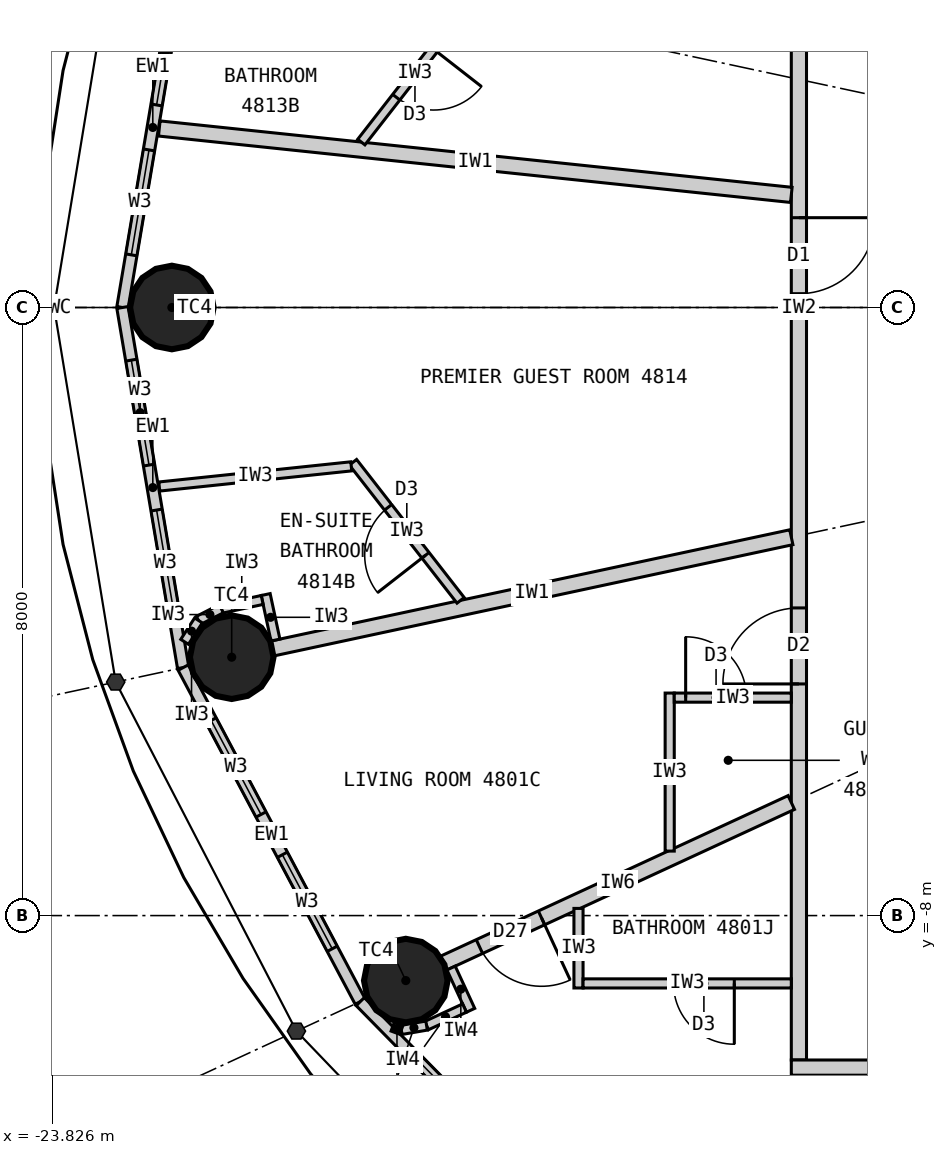
"""IFC4 building model, lengths in metres.
Left out: names, types, materials, properties, quantities, classifications, styles, units other than length and angle.
Written with IfcOpenShell. Run it as: python <this file> out.ifc"""

import sys

from ifc_helpers import new_model, si_unit, direction, frame, frame_2d, origin, origin_2d, place, context, subcontext, project, spatial, rectangle, circle, extrude, element, fill, save


model = new_model("IFC4")
c1 = context("Model", 3, precision=1e-05, world=origin(), true_north=direction((0.0, 1.0)))
c2 = subcontext(c1, "Body", "Model", "MODEL_VIEW")
j1 = project(units=[si_unit("LENGTHUNIT", "METRE"), si_unit("PLANEANGLEUNIT", "RADIAN")], contexts=[c1])
p1 = place(None, origin())
s1 = spatial("IfcSite", under=j1, at=p1, CompositionType="ELEMENT")
p2 = place(p1, origin())
s2 = spatial("IfcBuilding", under=s1, at=p2, CompositionType="ELEMENT")
p3 = place(p2, frame((0.0, 0.0, 179.7)))
s3 = spatial("IfcBuildingStorey", under=s2, at=p3, CompositionType="ELEMENT", Elevation=179.7)
for number, where, z_axis, x_axis in (
    (1, (-22.25, 0.0, 0.0), (0.0, 0.0, 1.0), (1.0, 0.0, 0.0)),
    (2, (-21.463, -4.601, 0.0), (0.0, 0.0, 1.0), (1.0, 0.0, 0.0)),
    (3, (-19.172, -8.855, 0.0), (0.0, 0.0, 1.0), (1.0, 0.0, 0.0)),
):
    element("IfcColumn", number, at=place(p3, frame(where, z_axis=z_axis, x_axis=x_axis)), inside=s3, PredefinedType="COLUMN", context=c2, shape_type="SweptSolid", body=[
        extrude(circle(Radius=0.55, at=origin_2d()), origin(), (0.0, 0.0, 1.0), 3.3),
    ])
p4 = place(p3, frame((-22.102, 4.738, 0.0), z_axis=(0.0, 0.0, 1.0), x_axis=(-0.166162111254, -0.986098449843, 0.0)))
e4 = element("IfcWall", 4, at=p4, inside=s3, PredefinedType="ELEMENTEDWALL", context=c2, shape_type="SweptSolid", body=[
    extrude(rectangle(XDim=4.805, YDim=0.15, at=frame_2d((2.402, 0.0))), origin(), (0.0, 0.0, 1.0), 3.12),
])
p5 = place(p4, frame((0.702, 0.0, 0.9)))
e5 = element("IfcOpeningElement", 5, at=p5, cuts=e4, PredefinedType="OPENING", context=c2, shape_type="SweptSolid", body=[
    extrude(rectangle(XDim=1.4, YDim=1.9, at=frame_2d((0.7, 0.95))), frame((0.0, 0.085, 0.0), z_axis=(0.0, -1.0, 0.0), x_axis=(1.0, 0.0, 0.0)), (0.0, 0.0, 1.0), 0.17),
])
p6 = place(p4, frame((2.702, 0.0, 0.9)))
e6 = element("IfcOpeningElement", 6, at=p6, cuts=e4, PredefinedType="OPENING", context=c2, shape_type="SweptSolid", body=[
    extrude(rectangle(XDim=1.4, YDim=1.9, at=frame_2d((0.7, 0.95))), frame((0.0, 0.085, 0.0), z_axis=(0.0, -1.0, 0.0), x_axis=(1.0, 0.0, 0.0)), (0.0, 0.0, 1.0), 0.17),
])
p7 = place(p3, frame((-22.9, 0.0, 0.0), z_axis=(0.0, 0.0, 1.0), x_axis=(0.166162111254, -0.986098449843, 0.0)))
e7 = element("IfcWall", 7, at=p7, inside=s3, PredefinedType="ELEMENTEDWALL", context=c2, shape_type="SweptSolid", body=[
    extrude(rectangle(XDim=4.805, YDim=0.15, at=frame_2d((2.402, 0.0))), origin(), (0.0, 0.0, 1.0), 3.12),
])
p8 = place(p7, frame((0.702, 0.0, 0.9)))
e8 = element("IfcOpeningElement", 8, at=p8, cuts=e7, PredefinedType="OPENING", context=c2, shape_type="SweptSolid", body=[
    extrude(rectangle(XDim=1.4, YDim=1.9, at=frame_2d((0.7, 0.95))), frame((0.0, 0.085, 0.0), z_axis=(0.0, -1.0, 0.0), x_axis=(1.0, 0.0, 0.0)), (0.0, 0.0, 1.0), 0.17),
])
p9 = place(p7, frame((2.702, 0.0, 0.9)))
e9 = element("IfcOpeningElement", 9, at=p9, cuts=e7, PredefinedType="OPENING", context=c2, shape_type="SweptSolid", body=[
    extrude(rectangle(XDim=1.4, YDim=1.9, at=frame_2d((0.7, 0.95))), frame((0.0, 0.085, 0.0), z_axis=(0.0, -1.0, 0.0), x_axis=(1.0, 0.0, 0.0)), (0.0, 0.0, 1.0), 0.17),
])
p10 = place(p3, frame((-22.102, -4.738, 0.0), z_axis=(0.0, 0.0, 1.0), x_axis=(0.468428906714, -0.883501193748, 0.0)))
e10 = element("IfcWall", 10, at=p10, inside=s3, PredefinedType="ELEMENTEDWALL", context=c2, shape_type="SweptSolid", body=[
    extrude(rectangle(XDim=4.974, YDim=0.15, at=frame_2d((2.487, 0.0))), origin(), (0.0, 0.0, 1.0), 3.12),
])
p11 = place(p10, frame((0.787, 0.0, 0.9)))
e11 = element("IfcOpeningElement", 11, at=p11, cuts=e10, PredefinedType="OPENING", context=c2, shape_type="SweptSolid", body=[
    extrude(rectangle(XDim=1.4, YDim=1.9, at=frame_2d((0.7, 0.95))), frame((0.0, 0.085, 0.0), z_axis=(0.0, -1.0, 0.0), x_axis=(1.0, 0.0, 0.0)), (0.0, 0.0, 1.0), 0.17),
])
p12 = place(p10, frame((2.787, 0.0, 0.9)))
e12 = element("IfcOpeningElement", 12, at=p12, cuts=e10, PredefinedType="OPENING", context=c2, shape_type="SweptSolid", body=[
    extrude(rectangle(XDim=1.4, YDim=1.9, at=frame_2d((0.7, 0.95))), frame((0.0, 0.085, 0.0), z_axis=(0.0, -1.0, 0.0), x_axis=(1.0, 0.0, 0.0)), (0.0, 0.0, 1.0), 0.17),
])
p13 = place(p3, frame((-19.772, -9.132, 0.0), z_axis=(0.0, 0.0, 1.0), x_axis=(0.700727467776, -0.71342905457, 0.0)))
e13 = element("IfcWall", 13, at=p13, inside=s3, PredefinedType="ELEMENTEDWALL", context=c2, shape_type="SweptSolid", body=[
    extrude(rectangle(XDim=5.247, YDim=0.15, at=frame_2d((2.624, 0.0))), origin(), (0.0, 0.0, 1.0), 3.12),
])
p14 = place(p13, frame((0.924, 0.0, 0.9)))
e14 = element("IfcOpeningElement", 14, at=p14, cuts=e13, PredefinedType="OPENING", context=c2, shape_type="SweptSolid", body=[
    extrude(rectangle(XDim=1.4, YDim=1.9, at=frame_2d((0.7, 0.95))), frame((0.0, 0.085, 0.0), z_axis=(0.0, -1.0, 0.0), x_axis=(1.0, 0.0, 0.0)), (0.0, 0.0, 1.0), 0.17),
])
p15 = place(p13, frame((2.924, 0.0, 0.9)))
e15 = element("IfcOpeningElement", 15, at=p15, cuts=e13, PredefinedType="OPENING", context=c2, shape_type="SweptSolid", body=[
    extrude(rectangle(XDim=1.4, YDim=1.9, at=frame_2d((0.7, 0.95))), frame((0.0, 0.085, 0.0), z_axis=(0.0, -1.0, 0.0), x_axis=(1.0, 0.0, 0.0)), (0.0, 0.0, 1.0), 0.17),
])
p16 = place(p3, frame((-14.0, 9.9, 0.0), z_axis=(0.0, 0.0, 1.0), x_axis=(0.0, -1.0, 0.0)))
e16 = element("IfcWall", 16, at=p16, inside=s3, PredefinedType="PARTITIONING", context=c2, shape_type="SweptSolid", body=[
    extrude(rectangle(XDim=19.8, YDim=0.2, at=frame_2d((9.9, 0.0))), origin(), (0.0, 0.0, 1.0), 3.12),
])
p17 = place(p16, frame((13.853, 0.0, 0.0)))
e17 = element("IfcOpeningElement", 17, at=p17, cuts=e16, PredefinedType="OPENING", context=c2, shape_type="SweptSolid", body=[
    extrude(rectangle(XDim=1.0, YDim=2.2, at=frame_2d((0.5, 1.1))), frame((0.0, 0.11, 0.0), z_axis=(0.0, -1.0, 0.0), x_axis=(1.0, 0.0, 0.0)), (0.0, 0.0, 1.0), 0.22),
])
p18 = place(p16, frame((1.1, 0.0, 0.0)))
e18 = element("IfcOpeningElement", 18, at=p18, cuts=e16, PredefinedType="OPENING", context=c2, shape_type="SweptSolid", body=[
    extrude(rectangle(XDim=1.0, YDim=2.2, at=frame_2d((0.5, 1.1))), frame((0.0, 0.11, 0.0), z_axis=(0.0, -1.0, 0.0), x_axis=(1.0, 0.0, 0.0)), (0.0, 0.0, 1.0), 0.22),
])
p19 = place(p16, frame((3.688, 0.0, 0.0)))
e19 = element("IfcOpeningElement", 19, at=p19, cuts=e16, PredefinedType="OPENING", context=c2, shape_type="SweptSolid", body=[
    extrude(rectangle(XDim=1.0, YDim=2.2, at=frame_2d((0.5, 1.1))), frame((0.0, 0.11, 0.0), z_axis=(0.0, -1.0, 0.0), x_axis=(1.0, 0.0, 0.0)), (0.0, 0.0, 1.0), 0.22),
])
p20 = place(p16, frame((8.719, 0.0, 0.0)))
e20 = element("IfcOpeningElement", 20, at=p20, cuts=e16, PredefinedType="OPENING", context=c2, shape_type="SweptSolid", body=[
    extrude(rectangle(XDim=1.0, YDim=2.2, at=frame_2d((0.5, 1.1))), frame((0.0, 0.11, 0.0), z_axis=(0.0, -1.0, 0.0), x_axis=(1.0, 0.0, 0.0)), (0.0, 0.0, 1.0), 0.22),
])
p21 = place(p3, frame((-14.1, 1.481, 0.0), z_axis=(0.0, 0.0, 1.0), x_axis=(-0.994524794819, 0.104500873159, 0.0)))
e21 = element("IfcWall", 21, at=p21, inside=s3, PredefinedType="PARTITIONING", context=c2, shape_type="SweptSolid", body=[
    extrude(rectangle(XDim=8.362, YDim=0.2, at=frame_2d((4.181, 0.0))), origin(), (0.0, 0.0, 1.0), 2.37),
])
p22 = place(p3, frame((-14.1, -3.022, 0.0), z_axis=(0.0, 0.0, 1.0), x_axis=(-0.977790639684, -0.209584028367, 0.0)))
e22 = element("IfcWall", 22, at=p22, inside=s3, PredefinedType="PARTITIONING", context=c2, shape_type="SweptSolid", body=[
    extrude(rectangle(XDim=6.98, YDim=0.2, at=frame_2d((3.49, 0.0))), origin(), (0.0, 0.0, 1.0), 2.27),
])
p23 = place(p3, frame((-14.1, -6.512, 0.0), z_axis=(0.0, 0.0, 1.0), x_axis=(-0.907823150669, -0.419353224751, 0.0)))
e23 = element("IfcWall", 23, at=p23, inside=s3, PredefinedType="PARTITIONING", context=c2, shape_type="SweptSolid", body=[
    extrude(rectangle(XDim=5.037, YDim=0.2, at=frame_2d((2.519, 0.0))), origin(), (0.0, 0.0, 1.0), 2.22),
])
p24 = place(p23, frame((3.62, 0.0, 0.0)))
e24 = element("IfcOpeningElement", 24, at=p24, cuts=e23, PredefinedType="OPENING", context=c2, shape_type="SweptSolid", body=[
    extrude(rectangle(XDim=0.9, YDim=2.1, at=frame_2d((0.45, 1.05))), frame((0.0, 0.11, 0.0), z_axis=(0.0, -1.0, 0.0), x_axis=(1.0, 0.0, 0.0)), (0.0, 0.0, 1.0), 0.22),
])
p25 = place(p3, frame((-12.625, -10.1, 0.0), z_axis=(0.0, 0.0, 1.0), x_axis=(-0.780876185034, -0.624685827954, 0.0)))
e25 = element("IfcWall", 25, at=p25, inside=s3, PredefinedType="PARTITIONING", context=c2, shape_type="SweptSolid", body=[
    extrude(rectangle(XDim=3.229, YDim=0.2, at=frame_2d((1.615, 0.0))), origin(), (0.0, 0.0, 1.0), 2.27),
])
p26 = place(p3, frame((-15.7, -7.152, 0.0), z_axis=(0.0, 0.0, 1.0), x_axis=(0.0, 1.0, 0.0)))
e26 = element("IfcWall", 26, at=p26, inside=s3, PredefinedType="PARTITIONING", context=c2, shape_type="SweptSolid", body=[
    extrude(rectangle(XDim=2.079, YDim=0.12, at=frame_2d((1.04, 0.0))), origin(), (0.0, 0.0, 1.0), 3.12),
])
p27 = place(p3, frame((-14.1, -5.133, 0.0), z_axis=(0.0, 0.0, 1.0), x_axis=(-1.0, 0.0, 0.0)))
e27 = element("IfcWall", 27, at=p27, inside=s3, PredefinedType="PARTITIONING", context=c2, shape_type="SweptSolid", body=[
    extrude(rectangle(XDim=1.54, YDim=0.12, at=frame_2d((0.77, 0.0))), origin(), (0.0, 0.0, 1.0), 3.12),
])
p28 = place(p27, frame((0.59, 0.0, 0.0)))
e28 = element("IfcOpeningElement", 28, at=p28, cuts=e27, PredefinedType="OPENING", context=c2, shape_type="SweptSolid", body=[
    extrude(rectangle(XDim=0.8, YDim=2.1, at=frame_2d((0.4, 1.05))), frame((0.0, 0.07, 0.0), z_axis=(0.0, -1.0, 0.0), x_axis=(1.0, 0.0, 0.0)), (0.0, 0.0, 1.0), 0.14),
])
p29 = place(p3, frame((-16.9, -7.906, 0.0), z_axis=(0.0, 0.0, 1.0), x_axis=(0.0, -1.0, 0.0)))
e29 = element("IfcWall", 29, at=p29, inside=s3, PredefinedType="PARTITIONING", context=c2, shape_type="SweptSolid", body=[
    extrude(rectangle(XDim=1.047, YDim=0.12, at=frame_2d((0.523, 0.0))), origin(), (0.0, 0.0, 1.0), 3.12),
])
p30 = place(p3, frame((-14.1, -8.893, 0.0), z_axis=(0.0, 0.0, 1.0), x_axis=(-1.0, 0.0, 0.0)))
e30 = element("IfcWall", 30, at=p30, inside=s3, PredefinedType="PARTITIONING", context=c2, shape_type="SweptSolid", body=[
    extrude(rectangle(XDim=2.74, YDim=0.12, at=frame_2d((1.37, 0.0))), origin(), (0.0, 0.0, 1.0), 3.12),
])
p31 = place(p30, frame((0.75, 0.0, 0.0)))
e31 = element("IfcOpeningElement", 31, at=p31, cuts=e30, PredefinedType="OPENING", context=c2, shape_type="SweptSolid", body=[
    extrude(rectangle(XDim=0.8, YDim=2.1, at=frame_2d((0.4, 1.05))), frame((0.0, 0.07, 0.0), z_axis=(0.0, -1.0, 0.0), x_axis=(1.0, 0.0, 0.0)), (0.0, 0.0, 1.0), 0.14),
])
p32 = place(p3, frame((-19.758, 2.177, 0.0), z_axis=(0.0, 0.0, 1.0), x_axis=(0.614713147302, 0.788750750576, 0.0)))
e32 = element("IfcWall", 32, at=p32, inside=s3, PredefinedType="PARTITIONING", context=c2, shape_type="SweptSolid", body=[
    extrude(rectangle(XDim=2.296, YDim=0.12, at=frame_2d((1.148, 0.0))), origin(), (0.0, 0.0, 1.0), 3.12),
])
p33 = place(p32, frame((0.748, 0.0, 0.0)))
e33 = element("IfcOpeningElement", 33, at=p33, cuts=e32, PredefinedType="OPENING", context=c2, shape_type="SweptSolid", body=[
    extrude(rectangle(XDim=0.8, YDim=2.1, at=frame_2d((0.4, 1.05))), frame((0.0, 0.07, 0.0), z_axis=(0.0, -1.0, 0.0), x_axis=(1.0, 0.0, 0.0)), (0.0, 0.0, 1.0), 0.14),
])
p34 = place(p3, frame((-18.451, -3.853, 0.0), z_axis=(0.0, 0.0, 1.0), x_axis=(-0.614703538382, 0.788758239197, 0.0)))
e34 = element("IfcWall", 34, at=p34, inside=s3, PredefinedType="PARTITIONING", context=c2, shape_type="SweptSolid", body=[
    extrude(rectangle(XDim=2.303, YDim=0.12, at=frame_2d((1.152, 0.0))), origin(), (0.0, 0.0, 1.0), 3.12),
])
p35 = place(p34, frame((0.752, 0.0, 0.0)))
e35 = element("IfcOpeningElement", 35, at=p35, cuts=e34, PredefinedType="OPENING", context=c2, shape_type="SweptSolid", body=[
    extrude(rectangle(XDim=0.8, YDim=2.1, at=frame_2d((0.4, 1.05))), frame((0.0, 0.07, 0.0), z_axis=(0.0, -1.0, 0.0), x_axis=(1.0, 0.0, 0.0)), (0.0, 0.0, 1.0), 0.14),
])
p36 = place(p3, frame((-19.89, -2.09, 0.0), z_axis=(0.0, 0.0, 1.0), x_axis=(-0.994527025269, -0.104479644, 0.0)))
e36 = element("IfcWall", 36, at=p36, inside=s3, PredefinedType="PARTITIONING", context=c2, shape_type="SweptSolid", body=[
    extrude(rectangle(XDim=2.54, YDim=0.12, at=frame_2d((1.27, 0.0))), origin(), (0.0, 0.0, 1.0), 3.12),
])
p37 = place(p3, frame((-20.887, -4.375, 0.0), z_axis=(0.0, 0.0, 1.0), x_axis=(-0.209746941802, 0.977755705892, 0.0)))
e37 = element("IfcWall", 37, at=p37, inside=s3, PredefinedType="PARTITIONING", context=c2, shape_type="SweptSolid", body=[
    extrude(rectangle(XDim=0.612, YDim=0.12, at=frame_2d((0.306, 0.0))), origin(), (0.0, 0.0, 1.0), 3.12),
])
p38 = place(p3, frame((-21.062, -3.848, 0.0), z_axis=(0.0, 0.0, 1.0), x_axis=(-0.977789415726, -0.209589738521, 0.0)))
e38 = element("IfcWall", 38, at=p38, inside=s3, PredefinedType="PARTITIONING", context=c2, shape_type="SweptSolid", body=[
    extrude(rectangle(XDim=0.55, YDim=0.12, at=frame_2d((0.275, 0.0))), origin(), (0.0, 0.0, 1.0), 3.12),
])
p39 = place(p3, frame((-21.599, -3.963, 0.0), z_axis=(0.0, 0.0, 1.0), x_axis=(-0.890193602875, -0.455582428766, 0.0)))
e39 = element("IfcWall", 39, at=p39, inside=s3, PredefinedType="PARTITIONING", context=c2, shape_type="SweptSolid", body=[
    extrude(rectangle(XDim=0.338, YDim=0.12, at=frame_2d((0.169, 0.0))), origin(), (0.0, 0.0, 1.0), 3.12),
])
p40 = place(p3, frame((-21.9, -4.117, 0.0), z_axis=(0.0, 0.0, 1.0), x_axis=(-0.543582688681, -0.839355622228, 0.0)))
e40 = element("IfcWall", 40, at=p40, inside=s3, PredefinedType="PARTITIONING", context=c2, shape_type="SweptSolid", body=[
    extrude(rectangle(XDim=0.336, YDim=0.12, at=frame_2d((0.168, 0.0))), origin(), (0.0, 0.0, 1.0), 3.12),
])
p41 = place(p3, frame((-0.006, -10.0, 0.0), z_axis=(0.0, 0.0, 1.0), x_axis=(-1.0, 0.0, 0.0)))
e41 = element("IfcWall", 41, at=p41, inside=s3, PredefinedType="PARTITIONING", context=c2, shape_type="SweptSolid", body=[
    extrude(rectangle(XDim=14.094, YDim=0.2, at=frame_2d((7.047, 0.0))), origin(), (0.0, 0.0, 1.0), 3.12),
])
p42 = place(p41, frame((10.059, 0.0, 0.0)))
e42 = element("IfcOpeningElement", 42, at=p42, cuts=e41, PredefinedType="OPENING", context=c2, shape_type="SweptSolid", body=[
    extrude(rectangle(XDim=1.0, YDim=2.2, at=frame_2d((0.5, 1.1))), frame((0.0, 0.11, 0.0), z_axis=(0.0, -1.0, 0.0), x_axis=(1.0, 0.0, 0.0)), (0.0, 0.0, 1.0), 0.22),
])
p43 = place(p3, frame((-18.576, -8.69, 0.0), z_axis=(0.0, 0.0, 1.0), x_axis=(0.419083463716, -0.907947713494, 0.0)))
e43 = element("IfcWall", 43, at=p43, inside=s3, PredefinedType="PARTITIONING", context=c2, shape_type="SweptSolid", body=[
    extrude(rectangle(XDim=0.612, YDim=0.12, at=frame_2d((0.306, 0.0))), origin(), (0.0, 0.0, 1.0), 3.12),
])
p44 = place(p3, frame((-18.399, -9.217, 0.0), z_axis=(0.0, 0.0, 1.0), x_axis=(-0.907933393845, -0.419114485961, 0.0)))
e44 = element("IfcWall", 44, at=p44, inside=s3, PredefinedType="PARTITIONING", context=c2, shape_type="SweptSolid", body=[
    extrude(rectangle(XDim=0.55, YDim=0.12, at=frame_2d((0.275, 0.0))), origin(), (0.0, 0.0, 1.0), 3.12),
])
p45 = place(p3, frame((-18.899, -9.447, 0.0), z_axis=(0.0, 0.0, 1.0), x_axis=(-0.985338822624, -0.170608923066, 0.0)))
e45 = element("IfcWall", 45, at=p45, inside=s3, PredefinedType="PARTITIONING", context=c2, shape_type="SweptSolid", body=[
    extrude(rectangle(XDim=0.338, YDim=0.12, at=frame_2d((0.169, 0.0))), origin(), (0.0, 0.0, 1.0), 3.12),
])
p46 = place(p3, frame((-19.231, -9.505, 0.0), z_axis=(0.0, 0.0, 1.0), x_axis=(-0.938377418573, 0.345612239817, 0.0)))
e46 = element("IfcWall", 46, at=p46, inside=s3, PredefinedType="PARTITIONING", context=c2, shape_type="SweptSolid", body=[
    extrude(rectangle(XDim=0.122, YDim=0.12, at=frame_2d((0.061, 0.0))), origin(), (0.0, 0.0, 1.0), 3.12),
])
p47 = place(p5, origin())
e47 = element("IfcWindow", 47, at=p47, inside=s3, PartitioningType="SINGLE_PANEL", PredefinedType="WINDOW", context=c2, shape_type="SweptSolid", body=[
    extrude(rectangle(XDim=1.4, YDim=1.9, at=frame_2d((0.7, 0.95))), frame((0.0, 0.03, 0.0), z_axis=(0.0, -1.0, 0.0), x_axis=(1.0, 0.0, 0.0)), (0.0, 0.0, 1.0), 0.06),
])
fill(e5, e47)
p48 = place(p6, origin())
e48 = element("IfcWindow", 48, at=p48, inside=s3, PartitioningType="SINGLE_PANEL", PredefinedType="WINDOW", context=c2, shape_type="SweptSolid", body=[
    extrude(rectangle(XDim=1.4, YDim=1.9, at=frame_2d((0.7, 0.95))), frame((0.0, 0.03, 0.0), z_axis=(0.0, -1.0, 0.0), x_axis=(1.0, 0.0, 0.0)), (0.0, 0.0, 1.0), 0.06),
])
fill(e6, e48)
p49 = place(p8, origin())
e49 = element("IfcWindow", 49, at=p49, inside=s3, PartitioningType="SINGLE_PANEL", PredefinedType="WINDOW", context=c2, shape_type="SweptSolid", body=[
    extrude(rectangle(XDim=1.4, YDim=1.9, at=frame_2d((0.7, 0.95))), frame((0.0, 0.03, 0.0), z_axis=(0.0, -1.0, 0.0), x_axis=(1.0, 0.0, 0.0)), (0.0, 0.0, 1.0), 0.06),
])
fill(e8, e49)
p50 = place(p9, origin())
e50 = element("IfcWindow", 50, at=p50, inside=s3, PartitioningType="SINGLE_PANEL", PredefinedType="WINDOW", context=c2, shape_type="SweptSolid", body=[
    extrude(rectangle(XDim=1.4, YDim=1.9, at=frame_2d((0.7, 0.95))), frame((0.0, 0.03, 0.0), z_axis=(0.0, -1.0, 0.0), x_axis=(1.0, 0.0, 0.0)), (0.0, 0.0, 1.0), 0.06),
])
fill(e9, e50)
p51 = place(p11, origin())
e51 = element("IfcWindow", 51, at=p51, inside=s3, PartitioningType="SINGLE_PANEL", PredefinedType="WINDOW", context=c2, shape_type="SweptSolid", body=[
    extrude(rectangle(XDim=1.4, YDim=1.9, at=frame_2d((0.7, 0.95))), frame((0.0, 0.03, 0.0), z_axis=(0.0, -1.0, 0.0), x_axis=(1.0, 0.0, 0.0)), (0.0, 0.0, 1.0), 0.06),
])
fill(e11, e51)
p52 = place(p12, origin())
e52 = element("IfcWindow", 52, at=p52, inside=s3, PartitioningType="SINGLE_PANEL", PredefinedType="WINDOW", context=c2, shape_type="SweptSolid", body=[
    extrude(rectangle(XDim=1.4, YDim=1.9, at=frame_2d((0.7, 0.95))), frame((0.0, 0.03, 0.0), z_axis=(0.0, -1.0, 0.0), x_axis=(1.0, 0.0, 0.0)), (0.0, 0.0, 1.0), 0.06),
])
fill(e12, e52)
p53 = place(p14, origin())
e53 = element("IfcWindow", 53, at=p53, inside=s3, PartitioningType="SINGLE_PANEL", PredefinedType="WINDOW", context=c2, shape_type="SweptSolid", body=[
    extrude(rectangle(XDim=1.4, YDim=1.9, at=frame_2d((0.7, 0.95))), frame((0.0, 0.03, 0.0), z_axis=(0.0, -1.0, 0.0), x_axis=(1.0, 0.0, 0.0)), (0.0, 0.0, 1.0), 0.06),
])
fill(e14, e53)
p54 = place(p28, origin())
e54 = element("IfcDoor", 54, at=p54, inside=s3, OperationType="SINGLE_SWING_RIGHT", PredefinedType="DOOR", context=c2, shape_type="SweptSolid", body=[
    extrude(rectangle(XDim=0.8, YDim=2.1, at=frame_2d((0.4, 1.05))), frame((0.0, 0.025, 0.0), z_axis=(0.0, -1.0, 0.0), x_axis=(1.0, 0.0, 0.0)), (0.0, 0.0, 1.0), 0.05),
])
fill(e28, e54)
p55 = place(p17, origin())
e55 = element("IfcDoor", 55, at=p55, inside=s3, OperationType="SINGLE_SWING_RIGHT", PredefinedType="DOOR", context=c2, shape_type="SweptSolid", body=[
    extrude(rectangle(XDim=1.0, YDim=2.2, at=frame_2d((0.5, 1.1))), frame((0.0, 0.025, 0.0), z_axis=(0.0, -1.0, 0.0), x_axis=(1.0, 0.0, 0.0)), (0.0, 0.0, 1.0), 0.05),
])
fill(e17, e55)
p56 = place(p31, origin())
e56 = element("IfcDoor", 56, at=p56, inside=s3, OperationType="SINGLE_SWING_LEFT", PredefinedType="DOOR", context=c2, shape_type="SweptSolid", body=[
    extrude(rectangle(XDim=0.8, YDim=2.1, at=frame_2d((0.4, 1.05))), frame((0.0, 0.025, 0.0), z_axis=(0.0, -1.0, 0.0), x_axis=(1.0, 0.0, 0.0)), (0.0, 0.0, 1.0), 0.05),
])
fill(e31, e56)
p57 = place(p24, origin())
e57 = element("IfcDoor", 57, at=p57, inside=s3, OperationType="SINGLE_SWING_LEFT", PredefinedType="DOOR", context=c2, shape_type="SweptSolid", body=[
    extrude(rectangle(XDim=0.9, YDim=2.1, at=frame_2d((0.45, 1.05))), frame((0.0, 0.025, 0.0), z_axis=(0.0, -1.0, 0.0), x_axis=(1.0, 0.0, 0.0)), (0.0, 0.0, 1.0), 0.05),
])
fill(e24, e57)
p58 = place(p33, origin())
e58 = element("IfcDoor", 58, at=p58, inside=s3, OperationType="SINGLE_SWING_RIGHT", PredefinedType="DOOR", context=c2, shape_type="SweptSolid", body=[
    extrude(rectangle(XDim=0.8, YDim=2.1, at=frame_2d((0.4, 1.05))), frame((0.0, 0.025, 0.0), z_axis=(0.0, -1.0, 0.0), x_axis=(1.0, 0.0, 0.0)), (0.0, 0.0, 1.0), 0.05),
])
fill(e33, e58)
p59 = place(p35, origin())
e59 = element("IfcDoor", 59, at=p59, inside=s3, OperationType="SINGLE_SWING_LEFT", PredefinedType="DOOR", context=c2, shape_type="SweptSolid", body=[
    extrude(rectangle(XDim=0.8, YDim=2.1, at=frame_2d((0.4, 1.05))), frame((0.0, 0.025, 0.0), z_axis=(0.0, -1.0, 0.0), x_axis=(1.0, 0.0, 0.0)), (0.0, 0.0, 1.0), 0.05),
])
fill(e35, e59)
p60 = place(p20, origin())
e60 = element("IfcDoor", 60, at=p60, inside=s3, OperationType="SINGLE_SWING_LEFT", PredefinedType="DOOR", context=c2, shape_type="SweptSolid", body=[
    extrude(rectangle(XDim=1.0, YDim=2.2, at=frame_2d((0.5, 1.1))), frame((0.0, 0.025, 0.0), z_axis=(0.0, -1.0, 0.0), x_axis=(1.0, 0.0, 0.0)), (0.0, 0.0, 1.0), 0.05),
])
fill(e20, e60)
save(model, sys.argv[1])
